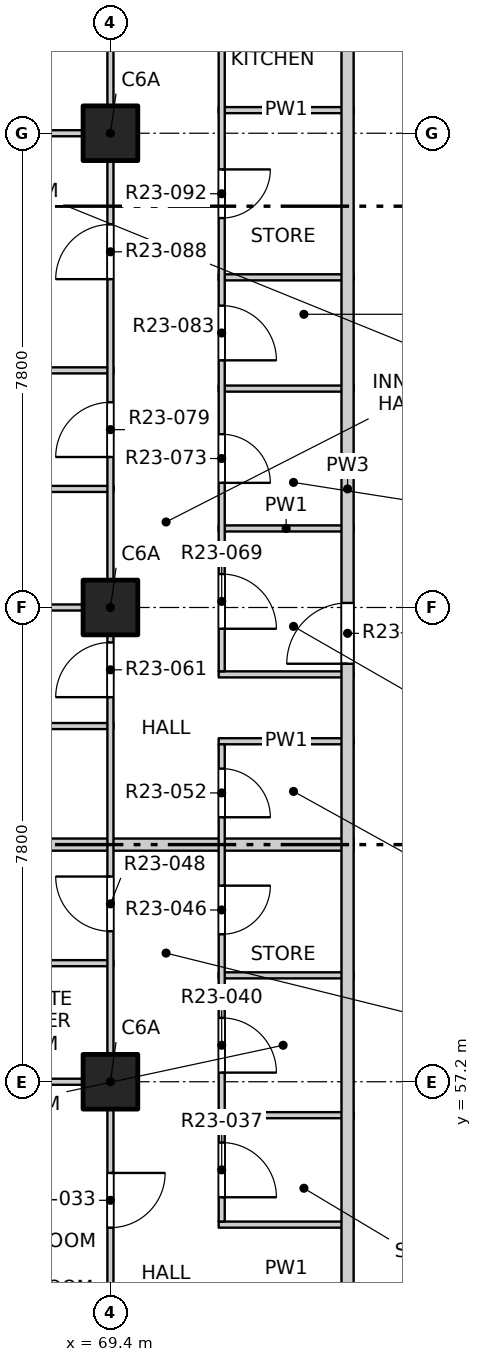
"""IFC4 building model, lengths in metres.
Left out: names, types, materials, properties, quantities, classifications, styles, units other than length and angle.
Written with IfcOpenShell. Run it as: python <this file> out.ifc"""

import sys

from ifc_helpers import new_model, si_unit, direction, frame, frame_2d, origin, origin_2d, place, context, subcontext, project, spatial, rectangle, extrude, element, fill, save


model = new_model("IFC4")
c1 = context("Model", 3, precision=1e-05, world=origin(), true_north=direction((0.0, 1.0)))
c2 = subcontext(c1, "Body", "Model", "MODEL_VIEW")
j1 = project(units=[si_unit("LENGTHUNIT", "METRE"), si_unit("PLANEANGLEUNIT", "RADIAN")], contexts=[c1])
p1 = place(None, origin())
s1 = spatial("IfcSite", under=j1, at=p1, CompositionType="ELEMENT")
p2 = place(p1, origin())
s2 = spatial("IfcBuilding", under=s1, at=p2, CompositionType="ELEMENT")
p3 = place(p2, frame((0.0, 0.0, 238.1)))
s3 = spatial("IfcBuildingStorey", under=s2, at=p3, CompositionType="ELEMENT", Elevation=238.1)
for number, where, z_axis, x_axis in (
    (1, (69.4, 57.2, -0.25), (0.0, 0.0, 1.0), (1.0, 0.0, 0.0)),
    (2, (69.4, 65.0, -0.25), (0.0, 0.0, 1.0), (1.0, 0.0, 0.0)),
    (3, (69.4, 72.8, -0.25), (0.0, 0.0, 1.0), (1.0, 0.0, 0.0)),
):
    element("IfcColumn", number, at=place(p3, frame(where, z_axis=z_axis, x_axis=x_axis)), inside=s3, PredefinedType="COLUMN", context=c2, shape_type="SweptSolid", body=[
        extrude(rectangle(XDim=0.9, YDim=0.9, at=origin_2d()), origin(), (0.0, 0.0, 1.0), 3.35),
    ])
for number, where, z_axis, x_axis in (
    (4, (71.18, 54.85, 0.0), (0.0, 0.0, 1.0), (1.0, 0.0, 0.0)),
    (5, (71.18, 56.65, 0.0), (0.0, 0.0, 1.0), (1.0, 0.0, 0.0)),
):
    element("IfcWall", number, at=place(p3, frame(where, z_axis=z_axis, x_axis=x_axis)), inside=s3, PredefinedType="PARTITIONING", context=c2, shape_type="SweptSolid", body=[
        extrude(rectangle(XDim=2.22, YDim=0.1, at=frame_2d((1.11, 0.0))), origin(), (0.0, 0.0, 1.0), 3.1),
    ])
p4 = place(p3, frame((61.9, 57.2, 0.0), z_axis=(0.0, 0.0, 1.0), x_axis=(1.0, 0.0, 0.0)))
e6 = element("IfcWall", 6, at=p4, inside=s3, PredefinedType="PARTITIONING", context=c2, shape_type="SweptSolid", body=[
    extrude(rectangle(XDim=7.55, YDim=0.1, at=frame_2d((3.775, 0.0))), origin(), (0.0, 0.0, 1.0), 3.1),
])
p5 = place(p3, frame((71.18, 58.95, 0.0), z_axis=(0.0, 0.0, 1.0), x_axis=(1.0, 0.0, 0.0)))
e7 = element("IfcWall", 7, at=p5, inside=s3, PredefinedType="PARTITIONING", context=c2, shape_type="SweptSolid", body=[
    extrude(rectangle(XDim=2.22, YDim=0.1, at=frame_2d((1.11, 0.0))), origin(), (0.0, 0.0, 1.0), 3.1),
])
p6 = place(p3, frame((66.05, 59.15, 0.0), z_axis=(0.0, 0.0, 1.0), x_axis=(1.0, 0.0, 0.0)))
e8 = element("IfcWall", 8, at=p6, inside=s3, PredefinedType="PARTITIONING", context=c2, shape_type="SweptSolid", body=[
    extrude(rectangle(XDim=3.4, YDim=0.1, at=frame_2d((1.7, 0.0))), origin(), (0.0, 0.0, 1.0), 3.1),
])
p7 = place(p3, frame((61.9, 61.1, 0.0), z_axis=(0.0, 0.0, 1.0), x_axis=(1.0, 0.0, 0.0)))
e9 = element("IfcWall", 9, at=p7, inside=s3, PredefinedType="PARTITIONING", context=c2, shape_type="SweptSolid", body=[
    extrude(rectangle(XDim=11.5, YDim=0.2, at=frame_2d((5.75, 0.0))), origin(), (0.0, 0.0, 1.0), 3.1),
])
p8 = place(p3, frame((71.18, 62.8, 0.0), z_axis=(0.0, 0.0, 1.0), x_axis=(1.0, 0.0, 0.0)))
e10 = element("IfcWall", 10, at=p8, inside=s3, PredefinedType="PARTITIONING", context=c2, shape_type="SweptSolid", body=[
    extrude(rectangle(XDim=2.22, YDim=0.1, at=frame_2d((1.11, 0.0))), origin(), (0.0, 0.0, 1.0), 3.1),
])
p9 = place(p3, frame((65.75, 63.05, 0.0), z_axis=(0.0, 0.0, 1.0), x_axis=(1.0, 0.0, 0.0)))
e11 = element("IfcWall", 11, at=p9, inside=s3, PredefinedType="PARTITIONING", context=c2, shape_type="SweptSolid", body=[
    extrude(rectangle(XDim=3.7, YDim=0.1, at=frame_2d((1.85, 0.0))), origin(), (0.0, 0.0, 1.0), 3.1),
])
p10 = place(p3, frame((71.18, 63.9, 0.0), z_axis=(0.0, 0.0, 1.0), x_axis=(1.0, 0.0, 0.0)))
e12 = element("IfcWall", 12, at=p10, inside=s3, PredefinedType="PARTITIONING", context=c2, shape_type="SweptSolid", body=[
    extrude(rectangle(XDim=2.22, YDim=0.1, at=frame_2d((1.11, 0.0))), origin(), (0.0, 0.0, 1.0), 3.1),
])
p11 = place(p3, frame((61.9, 65.0, 0.0), z_axis=(0.0, 0.0, 1.0), x_axis=(1.0, 0.0, 0.0)))
e13 = element("IfcWall", 13, at=p11, inside=s3, PredefinedType="PARTITIONING", context=c2, shape_type="SweptSolid", body=[
    extrude(rectangle(XDim=7.55, YDim=0.1, at=frame_2d((3.775, 0.0))), origin(), (0.0, 0.0, 1.0), 3.1),
])
p12 = place(p3, frame((71.18, 66.3, 0.0), z_axis=(0.0, 0.0, 1.0), x_axis=(1.0, 0.0, 0.0)))
e14 = element("IfcWall", 14, at=p12, inside=s3, PredefinedType="PARTITIONING", context=c2, shape_type="SweptSolid", body=[
    extrude(rectangle(XDim=2.22, YDim=0.1, at=frame_2d((1.11, 0.0))), origin(), (0.0, 0.0, 1.0), 3.1),
])
p13 = place(p3, frame((65.75, 66.95, 0.0), z_axis=(0.0, 0.0, 1.0), x_axis=(1.0, 0.0, 0.0)))
e15 = element("IfcWall", 15, at=p13, inside=s3, PredefinedType="PARTITIONING", context=c2, shape_type="SweptSolid", body=[
    extrude(rectangle(XDim=3.7, YDim=0.1, at=frame_2d((1.85, 0.0))), origin(), (0.0, 0.0, 1.0), 3.1),
])
p14 = place(p3, frame((71.18, 68.6, 0.0), z_axis=(0.0, 0.0, 1.0), x_axis=(1.0, 0.0, 0.0)))
e16 = element("IfcWall", 16, at=p14, inside=s3, PredefinedType="PARTITIONING", context=c2, shape_type="SweptSolid", body=[
    extrude(rectangle(XDim=2.22, YDim=0.1, at=frame_2d((1.11, 0.0))), origin(), (0.0, 0.0, 1.0), 3.1),
])
p15 = place(p3, frame((61.9, 68.9, 0.0), z_axis=(0.0, 0.0, 1.0), x_axis=(1.0, 0.0, 0.0)))
e17 = element("IfcWall", 17, at=p15, inside=s3, PredefinedType="PARTITIONING", context=c2, shape_type="SweptSolid", body=[
    extrude(rectangle(XDim=7.55, YDim=0.1, at=frame_2d((3.775, 0.0))), origin(), (0.0, 0.0, 1.0), 3.1),
])
p16 = place(p3, frame((71.18, 70.43, 0.0), z_axis=(0.0, 0.0, 1.0), x_axis=(1.0, 0.0, 0.0)))
e18 = element("IfcWall", 18, at=p16, inside=s3, PredefinedType="PARTITIONING", context=c2, shape_type="SweptSolid", body=[
    extrude(rectangle(XDim=2.22, YDim=0.1, at=frame_2d((1.11, 0.0))), origin(), (0.0, 0.0, 1.0), 3.1),
])
p17 = place(p3, frame((61.9, 72.8, 0.0), z_axis=(0.0, 0.0, 1.0), x_axis=(1.0, 0.0, 0.0)))
e19 = element("IfcWall", 19, at=p17, inside=s3, PredefinedType="PARTITIONING", context=c2, shape_type="SweptSolid", body=[
    extrude(rectangle(XDim=7.55, YDim=0.1, at=frame_2d((3.775, 0.0))), origin(), (0.0, 0.0, 1.0), 3.1),
])
p18 = place(p3, frame((71.18, 73.18, 0.0), z_axis=(0.0, 0.0, 1.0), x_axis=(1.0, 0.0, 0.0)))
e20 = element("IfcWall", 20, at=p18, inside=s3, PredefinedType="PARTITIONING", context=c2, shape_type="SweptSolid", body=[
    extrude(rectangle(XDim=2.22, YDim=0.1, at=frame_2d((1.11, 0.0))), origin(), (0.0, 0.0, 1.0), 3.1),
])
p19 = place(p3, frame((69.4, 41.9, 0.0), z_axis=(0.0, 0.0, 1.0), x_axis=(0.0, 1.0, 0.0)))
e21 = element("IfcWall", 21, at=p19, inside=s3, PredefinedType="PARTITIONING", context=c2, shape_type="SweptSolid", body=[
    extrude(rectangle(XDim=46.2, YDim=0.1, at=frame_2d((23.1, 0.0))), origin(), (0.0, 0.0, 1.0), 3.1),
])
p20 = place(p19, frame((1.2, 0.0, 0.0)))
e22 = element("IfcOpeningElement", 22, at=p20, cuts=e21, PredefinedType="OPENING", context=c2, shape_type="SweptSolid", body=[
    extrude(rectangle(XDim=0.9, YDim=2.1, at=frame_2d((0.45, 1.05))), frame((0.0, 0.06, 0.0), z_axis=(0.0, -1.0, 0.0), x_axis=(1.0, 0.0, 0.0)), (0.0, 0.0, 1.0), 0.12),
])
p21 = place(p19, frame((6.025, 0.0, 0.0)))
e23 = element("IfcOpeningElement", 23, at=p21, cuts=e21, PredefinedType="OPENING", context=c2, shape_type="SweptSolid", body=[
    extrude(rectangle(XDim=0.9, YDim=2.1, at=frame_2d((0.45, 1.05))), frame((0.0, 0.06, 0.0), z_axis=(0.0, -1.0, 0.0), x_axis=(1.0, 0.0, 0.0)), (0.0, 0.0, 1.0), 0.12),
])
p22 = place(p19, frame((9.975, 0.0, 0.0)))
e24 = element("IfcOpeningElement", 24, at=p22, cuts=e21, PredefinedType="OPENING", context=c2, shape_type="SweptSolid", body=[
    extrude(rectangle(XDim=0.9, YDim=2.1, at=frame_2d((0.45, 1.05))), frame((0.0, 0.06, 0.0), z_axis=(0.0, -1.0, 0.0), x_axis=(1.0, 0.0, 0.0)), (0.0, 0.0, 1.0), 0.12),
])
p23 = place(p19, frame((12.9, 0.0, 0.0)))
e25 = element("IfcOpeningElement", 25, at=p23, cuts=e21, PredefinedType="OPENING", context=c2, shape_type="SweptSolid", body=[
    extrude(rectangle(XDim=0.9, YDim=2.1, at=frame_2d((0.45, 1.05))), frame((0.0, 0.06, 0.0), z_axis=(0.0, -1.0, 0.0), x_axis=(1.0, 0.0, 0.0)), (0.0, 0.0, 1.0), 0.12),
])
p24 = place(p19, frame((17.775, 0.0, 0.0)))
e26 = element("IfcOpeningElement", 26, at=p24, cuts=e21, PredefinedType="OPENING", context=c2, shape_type="SweptSolid", body=[
    extrude(rectangle(XDim=0.9, YDim=2.1, at=frame_2d((0.45, 1.05))), frame((0.0, 0.06, 0.0), z_axis=(0.0, -1.0, 0.0), x_axis=(1.0, 0.0, 0.0)), (0.0, 0.0, 1.0), 0.12),
])
p25 = place(p19, frame((21.625, 0.0, 0.0)))
e27 = element("IfcOpeningElement", 27, at=p25, cuts=e21, PredefinedType="OPENING", context=c2, shape_type="SweptSolid", body=[
    extrude(rectangle(XDim=0.9, YDim=2.1, at=frame_2d((0.45, 1.05))), frame((0.0, 0.06, 0.0), z_axis=(0.0, -1.0, 0.0), x_axis=(1.0, 0.0, 0.0)), (0.0, 0.0, 1.0), 0.12),
])
p26 = place(p19, frame((25.575, 0.0, 0.0)))
e28 = element("IfcOpeningElement", 28, at=p26, cuts=e21, PredefinedType="OPENING", context=c2, shape_type="SweptSolid", body=[
    extrude(rectangle(XDim=0.9, YDim=2.1, at=frame_2d((0.45, 1.05))), frame((0.0, 0.06, 0.0), z_axis=(0.0, -1.0, 0.0), x_axis=(1.0, 0.0, 0.0)), (0.0, 0.0, 1.0), 0.12),
])
p27 = place(p19, frame((28.5, 0.0, 0.0)))
e29 = element("IfcOpeningElement", 29, at=p27, cuts=e21, PredefinedType="OPENING", context=c2, shape_type="SweptSolid", body=[
    extrude(rectangle(XDim=0.9, YDim=2.1, at=frame_2d((0.45, 1.05))), frame((0.0, 0.06, 0.0), z_axis=(0.0, -1.0, 0.0), x_axis=(1.0, 0.0, 0.0)), (0.0, 0.0, 1.0), 0.12),
])
p28 = place(p19, frame((32.4, 0.0, 0.0)))
e30 = element("IfcOpeningElement", 30, at=p28, cuts=e21, PredefinedType="OPENING", context=c2, shape_type="SweptSolid", body=[
    extrude(rectangle(XDim=0.9, YDim=2.1, at=frame_2d((0.45, 1.05))), frame((0.0, 0.06, 0.0), z_axis=(0.0, -1.0, 0.0), x_axis=(1.0, 0.0, 0.0)), (0.0, 0.0, 1.0), 0.12),
])
p29 = place(p19, frame((36.3, 0.0, 0.0)))
e31 = element("IfcOpeningElement", 31, at=p29, cuts=e21, PredefinedType="OPENING", context=c2, shape_type="SweptSolid", body=[
    extrude(rectangle(XDim=0.9, YDim=2.1, at=frame_2d((0.45, 1.05))), frame((0.0, 0.06, 0.0), z_axis=(0.0, -1.0, 0.0), x_axis=(1.0, 0.0, 0.0)), (0.0, 0.0, 1.0), 0.12),
])
p30 = place(p19, frame((40.2, 0.0, 0.0)))
e32 = element("IfcOpeningElement", 32, at=p30, cuts=e21, PredefinedType="OPENING", context=c2, shape_type="SweptSolid", body=[
    extrude(rectangle(XDim=0.9, YDim=2.1, at=frame_2d((0.45, 1.05))), frame((0.0, 0.06, 0.0), z_axis=(0.0, -1.0, 0.0), x_axis=(1.0, 0.0, 0.0)), (0.0, 0.0, 1.0), 0.12),
])
p31 = place(p19, frame((44.1, 0.0, 0.0)))
e33 = element("IfcOpeningElement", 33, at=p31, cuts=e21, PredefinedType="OPENING", context=c2, shape_type="SweptSolid", body=[
    extrude(rectangle(XDim=0.9, YDim=2.1, at=frame_2d((0.45, 1.05))), frame((0.0, 0.06, 0.0), z_axis=(0.0, -1.0, 0.0), x_axis=(1.0, 0.0, 0.0)), (0.0, 0.0, 1.0), 0.12),
])
p32 = place(p3, frame((71.23, 54.9, 0.0), z_axis=(0.0, 0.0, 1.0), x_axis=(0.0, 1.0, 0.0)))
e34 = element("IfcWall", 34, at=p32, inside=s3, PredefinedType="PARTITIONING", context=c2, shape_type="SweptSolid", body=[
    extrude(rectangle(XDim=7.85, YDim=0.1, at=frame_2d((3.925, 0.0))), origin(), (0.0, 0.0, 1.0), 3.1),
])
p33 = place(p32, frame((0.4, 0.0, 0.0)))
e35 = element("IfcOpeningElement", 35, at=p33, cuts=e34, PredefinedType="OPENING", context=c2, shape_type="SweptSolid", body=[
    extrude(rectangle(XDim=0.9, YDim=2.1, at=frame_2d((0.45, 1.05))), frame((0.0, 0.06, 0.0), z_axis=(0.0, -1.0, 0.0), x_axis=(1.0, 0.0, 0.0)), (0.0, 0.0, 1.0), 0.12),
])
p34 = place(p32, frame((2.45, 0.0, 0.0)))
e36 = element("IfcOpeningElement", 36, at=p34, cuts=e34, PredefinedType="OPENING", context=c2, shape_type="SweptSolid", body=[
    extrude(rectangle(XDim=0.9, YDim=2.1, at=frame_2d((0.45, 1.05))), frame((0.0, 0.06, 0.0), z_axis=(0.0, -1.0, 0.0), x_axis=(1.0, 0.0, 0.0)), (0.0, 0.0, 1.0), 0.12),
])
p35 = place(p32, frame((4.725, 0.0, 0.0)))
e37 = element("IfcOpeningElement", 37, at=p35, cuts=e34, PredefinedType="OPENING", context=c2, shape_type="SweptSolid", body=[
    extrude(rectangle(XDim=0.8, YDim=2.1, at=frame_2d((0.4, 1.05))), frame((0.0, 0.06, 0.0), z_axis=(0.0, -1.0, 0.0), x_axis=(1.0, 0.0, 0.0)), (0.0, 0.0, 1.0), 0.12),
])
p36 = place(p32, frame((6.65, 0.0, 0.0)))
e38 = element("IfcOpeningElement", 38, at=p36, cuts=e34, PredefinedType="OPENING", context=c2, shape_type="SweptSolid", body=[
    extrude(rectangle(XDim=0.8, YDim=2.1, at=frame_2d((0.4, 1.05))), frame((0.0, 0.06, 0.0), z_axis=(0.0, -1.0, 0.0), x_axis=(1.0, 0.0, 0.0)), (0.0, 0.0, 1.0), 0.12),
])
p37 = place(p3, frame((71.23, 63.95, 0.0), z_axis=(0.0, 0.0, 1.0), x_axis=(0.0, 1.0, 0.0)))
e39 = element("IfcWall", 39, at=p37, inside=s3, PredefinedType="PARTITIONING", context=c2, shape_type="SweptSolid", body=[
    extrude(rectangle(XDim=17.85, YDim=0.1, at=frame_2d((8.925, 0.0))), origin(), (0.0, 0.0, 1.0), 3.1),
])
p38 = place(p37, frame((0.7, 0.0, 0.0)))
e40 = element("IfcOpeningElement", 40, at=p38, cuts=e39, PredefinedType="OPENING", context=c2, shape_type="SweptSolid", body=[
    extrude(rectangle(XDim=0.9, YDim=2.1, at=frame_2d((0.45, 1.05))), frame((0.0, 0.06, 0.0), z_axis=(0.0, -1.0, 0.0), x_axis=(1.0, 0.0, 0.0)), (0.0, 0.0, 1.0), 0.12),
])
p39 = place(p37, frame((3.1, 0.0, 0.0)))
e41 = element("IfcOpeningElement", 41, at=p39, cuts=e39, PredefinedType="OPENING", context=c2, shape_type="SweptSolid", body=[
    extrude(rectangle(XDim=0.8, YDim=2.1, at=frame_2d((0.4, 1.05))), frame((0.0, 0.06, 0.0), z_axis=(0.0, -1.0, 0.0), x_axis=(1.0, 0.0, 0.0)), (0.0, 0.0, 1.0), 0.12),
])
p40 = place(p37, frame((5.115, 0.0, 0.0)))
e42 = element("IfcOpeningElement", 42, at=p40, cuts=e39, PredefinedType="OPENING", context=c2, shape_type="SweptSolid", body=[
    extrude(rectangle(XDim=0.9, YDim=2.1, at=frame_2d((0.45, 1.05))), frame((0.0, 0.06, 0.0), z_axis=(0.0, -1.0, 0.0), x_axis=(1.0, 0.0, 0.0)), (0.0, 0.0, 1.0), 0.12),
])
p41 = place(p37, frame((7.455, 0.0, 0.0)))
e43 = element("IfcOpeningElement", 43, at=p41, cuts=e39, PredefinedType="OPENING", context=c2, shape_type="SweptSolid", body=[
    extrude(rectangle(XDim=0.8, YDim=2.1, at=frame_2d((0.4, 1.05))), frame((0.0, 0.06, 0.0), z_axis=(0.0, -1.0, 0.0), x_axis=(1.0, 0.0, 0.0)), (0.0, 0.0, 1.0), 0.12),
])
p42 = place(p37, frame((10.54, 0.0, 0.0)))
e44 = element("IfcOpeningElement", 44, at=p42, cuts=e39, PredefinedType="OPENING", context=c2, shape_type="SweptSolid", body=[
    extrude(rectangle(XDim=0.9, YDim=2.1, at=frame_2d((0.45, 1.05))), frame((0.0, 0.06, 0.0), z_axis=(0.0, -1.0, 0.0), x_axis=(1.0, 0.0, 0.0)), (0.0, 0.0, 1.0), 0.12),
])
p43 = place(p37, frame((13.425, 0.0, 0.0)))
e45 = element("IfcOpeningElement", 45, at=p43, cuts=e39, PredefinedType="OPENING", context=c2, shape_type="SweptSolid", body=[
    extrude(rectangle(XDim=0.8, YDim=2.1, at=frame_2d((0.4, 1.05))), frame((0.0, 0.06, 0.0), z_axis=(0.0, -1.0, 0.0), x_axis=(1.0, 0.0, 0.0)), (0.0, 0.0, 1.0), 0.12),
])
p44 = place(p37, frame((15.95, 0.0, 0.0)))
e46 = element("IfcOpeningElement", 46, at=p44, cuts=e39, PredefinedType="OPENING", context=c2, shape_type="SweptSolid", body=[
    extrude(rectangle(XDim=0.9, YDim=2.1, at=frame_2d((0.45, 1.05))), frame((0.0, 0.06, 0.0), z_axis=(0.0, -1.0, 0.0), x_axis=(1.0, 0.0, 0.0)), (0.0, 0.0, 1.0), 0.12),
])
p45 = place(p3, frame((73.3, 49.5, 0.0), z_axis=(0.0, 0.0, 1.0), x_axis=(0.0, 1.0, 0.0)))
e47 = element("IfcWall", 47, at=p45, inside=s3, PredefinedType="PARTITIONING", context=c2, shape_type="SweptSolid", body=[
    extrude(rectangle(XDim=34.9, YDim=0.2, at=frame_2d((17.45, 0.0))), origin(), (0.0, 0.0, 1.0), 3.1),
])
p46 = place(p45, frame((3.075, 0.0, 0.0)))
e48 = element("IfcOpeningElement", 48, at=p46, cuts=e47, PredefinedType="OPENING", context=c2, shape_type="SweptSolid", body=[
    extrude(rectangle(XDim=1.0, YDim=2.1, at=frame_2d((0.5, 1.05))), frame((0.0, 0.11, 0.0), z_axis=(0.0, -1.0, 0.0), x_axis=(1.0, 0.0, 0.0)), (0.0, 0.0, 1.0), 0.22),
])
p47 = place(p45, frame((14.575, 0.0, 0.0)))
e49 = element("IfcOpeningElement", 49, at=p47, cuts=e47, PredefinedType="OPENING", context=c2, shape_type="SweptSolid", body=[
    extrude(rectangle(XDim=1.0, YDim=2.1, at=frame_2d((0.5, 1.05))), frame((0.0, 0.11, 0.0), z_axis=(0.0, -1.0, 0.0), x_axis=(1.0, 0.0, 0.0)), (0.0, 0.0, 1.0), 0.22),
])
p48 = place(p45, frame((33.625, 0.0, 0.0)))
e50 = element("IfcOpeningElement", 50, at=p48, cuts=e47, PredefinedType="OPENING", context=c2, shape_type="SweptSolid", body=[
    extrude(rectangle(XDim=1.0, YDim=2.1, at=frame_2d((0.5, 1.05))), frame((0.0, 0.11, 0.0), z_axis=(0.0, -1.0, 0.0), x_axis=(1.0, 0.0, 0.0)), (0.0, 0.0, 1.0), 0.22),
])
p49 = place(p23, origin())
e51 = element("IfcDoor", 51, at=p49, inside=s3, OperationType="SINGLE_SWING_LEFT", PredefinedType="DOOR", context=c2, shape_type="SweptSolid", body=[
    extrude(rectangle(XDim=0.9, YDim=2.1, at=frame_2d((0.45, 1.05))), frame((0.0, 0.025, 0.0), z_axis=(0.0, -1.0, 0.0), x_axis=(1.0, 0.0, 0.0)), (0.0, 0.0, 1.0), 0.05),
])
fill(e25, e51)
p50 = place(p33, origin())
e52 = element("IfcDoor", 52, at=p50, inside=s3, OperationType="SINGLE_SWING_RIGHT", PredefinedType="DOOR", context=c2, shape_type="SweptSolid", body=[
    extrude(rectangle(XDim=0.9, YDim=2.1, at=frame_2d((0.45, 1.05))), frame((0.0, 0.025, 0.0), z_axis=(0.0, -1.0, 0.0), x_axis=(1.0, 0.0, 0.0)), (0.0, 0.0, 1.0), 0.05),
])
fill(e35, e52)
p51 = place(p34, origin())
e53 = element("IfcDoor", 53, at=p51, inside=s3, OperationType="SINGLE_SWING_RIGHT", PredefinedType="DOOR", context=c2, shape_type="SweptSolid", body=[
    extrude(rectangle(XDim=0.9, YDim=2.1, at=frame_2d((0.45, 1.05))), frame((0.0, 0.025, 0.0), z_axis=(0.0, -1.0, 0.0), x_axis=(1.0, 0.0, 0.0)), (0.0, 0.0, 1.0), 0.05),
])
fill(e36, e53)
p52 = place(p35, origin())
e54 = element("IfcDoor", 54, at=p52, inside=s3, OperationType="SINGLE_SWING_LEFT", PredefinedType="DOOR", context=c2, shape_type="SweptSolid", body=[
    extrude(rectangle(XDim=0.8, YDim=2.1, at=frame_2d((0.4, 1.05))), frame((0.0, 0.025, 0.0), z_axis=(0.0, -1.0, 0.0), x_axis=(1.0, 0.0, 0.0)), (0.0, 0.0, 1.0), 0.05),
])
fill(e37, e54)
p53 = place(p24, origin())
e55 = element("IfcDoor", 55, at=p53, inside=s3, OperationType="SINGLE_SWING_RIGHT", PredefinedType="DOOR", context=c2, shape_type="SweptSolid", body=[
    extrude(rectangle(XDim=0.9, YDim=2.1, at=frame_2d((0.45, 1.05))), frame((0.0, 0.025, 0.0), z_axis=(0.0, -1.0, 0.0), x_axis=(1.0, 0.0, 0.0)), (0.0, 0.0, 1.0), 0.05),
])
fill(e26, e55)
p54 = place(p36, origin())
e56 = element("IfcDoor", 56, at=p54, inside=s3, OperationType="SINGLE_SWING_RIGHT", PredefinedType="DOOR", context=c2, shape_type="SweptSolid", body=[
    extrude(rectangle(XDim=0.8, YDim=2.1, at=frame_2d((0.4, 1.05))), frame((0.0, 0.025, 0.0), z_axis=(0.0, -1.0, 0.0), x_axis=(1.0, 0.0, 0.0)), (0.0, 0.0, 1.0), 0.05),
])
fill(e38, e56)
p55 = place(p25, origin())
e57 = element("IfcDoor", 57, at=p55, inside=s3, OperationType="SINGLE_SWING_LEFT", PredefinedType="DOOR", context=c2, shape_type="SweptSolid", body=[
    extrude(rectangle(XDim=0.9, YDim=2.1, at=frame_2d((0.45, 1.05))), frame((0.0, 0.025, 0.0), z_axis=(0.0, -1.0, 0.0), x_axis=(1.0, 0.0, 0.0)), (0.0, 0.0, 1.0), 0.05),
])
fill(e27, e57)
p56 = place(p47, origin())
e58 = element("IfcDoor", 58, at=p56, inside=s3, OperationType="SINGLE_SWING_RIGHT", PredefinedType="DOOR", context=c2, shape_type="SweptSolid", body=[
    extrude(rectangle(XDim=1.0, YDim=2.1, at=frame_2d((0.5, 1.05))), frame((0.0, 0.025, 0.0), z_axis=(0.0, -1.0, 0.0), x_axis=(1.0, 0.0, 0.0)), (0.0, 0.0, 1.0), 0.05),
])
fill(e49, e58)
p57 = place(p38, origin())
e59 = element("IfcDoor", 59, at=p57, inside=s3, OperationType="SINGLE_SWING_RIGHT", PredefinedType="DOOR", context=c2, shape_type="SweptSolid", body=[
    extrude(rectangle(XDim=0.9, YDim=2.1, at=frame_2d((0.45, 1.05))), frame((0.0, 0.025, 0.0), z_axis=(0.0, -1.0, 0.0), x_axis=(1.0, 0.0, 0.0)), (0.0, 0.0, 1.0), 0.05),
])
fill(e40, e59)
p58 = place(p39, origin())
e60 = element("IfcDoor", 60, at=p58, inside=s3, OperationType="SINGLE_SWING_RIGHT", PredefinedType="DOOR", context=c2, shape_type="SweptSolid", body=[
    extrude(rectangle(XDim=0.8, YDim=2.1, at=frame_2d((0.4, 1.05))), frame((0.0, 0.025, 0.0), z_axis=(0.0, -1.0, 0.0), x_axis=(1.0, 0.0, 0.0)), (0.0, 0.0, 1.0), 0.05),
])
fill(e41, e60)
p59 = place(p26, origin())
e61 = element("IfcDoor", 61, at=p59, inside=s3, OperationType="SINGLE_SWING_LEFT", PredefinedType="DOOR", context=c2, shape_type="SweptSolid", body=[
    extrude(rectangle(XDim=0.9, YDim=2.1, at=frame_2d((0.45, 1.05))), frame((0.0, 0.025, 0.0), z_axis=(0.0, -1.0, 0.0), x_axis=(1.0, 0.0, 0.0)), (0.0, 0.0, 1.0), 0.05),
])
fill(e28, e61)
p60 = place(p40, origin())
e62 = element("IfcDoor", 62, at=p60, inside=s3, OperationType="SINGLE_SWING_RIGHT", PredefinedType="DOOR", context=c2, shape_type="SweptSolid", body=[
    extrude(rectangle(XDim=0.9, YDim=2.1, at=frame_2d((0.45, 1.05))), frame((0.0, 0.025, 0.0), z_axis=(0.0, -1.0, 0.0), x_axis=(1.0, 0.0, 0.0)), (0.0, 0.0, 1.0), 0.05),
])
fill(e42, e62)
p61 = place(p27, origin())
e63 = element("IfcDoor", 63, at=p61, inside=s3, OperationType="SINGLE_SWING_LEFT", PredefinedType="DOOR", context=c2, shape_type="SweptSolid", body=[
    extrude(rectangle(XDim=0.9, YDim=2.1, at=frame_2d((0.45, 1.05))), frame((0.0, 0.025, 0.0), z_axis=(0.0, -1.0, 0.0), x_axis=(1.0, 0.0, 0.0)), (0.0, 0.0, 1.0), 0.05),
])
fill(e29, e63)
p62 = place(p41, origin())
e64 = element("IfcDoor", 64, at=p62, inside=s3, OperationType="SINGLE_SWING_LEFT", PredefinedType="DOOR", context=c2, shape_type="SweptSolid", body=[
    extrude(rectangle(XDim=0.8, YDim=2.1, at=frame_2d((0.4, 1.05))), frame((0.0, 0.025, 0.0), z_axis=(0.0, -1.0, 0.0), x_axis=(1.0, 0.0, 0.0)), (0.0, 0.0, 1.0), 0.05),
])
fill(e43, e64)
save(model, sys.argv[1])
